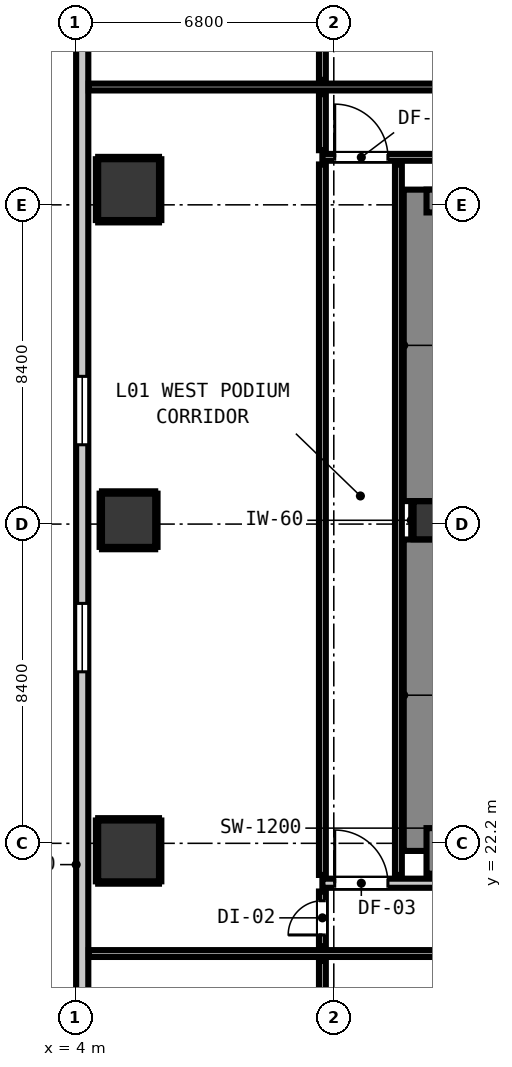
"""IFC4 building model, lengths in metres.
Left out: names, types, materials, properties, quantities, classifications, styles, units other than length and angle.
Written with IfcOpenShell. Run it as: python <this file> out.ifc"""

import sys

from ifc_helpers import new_model, si_unit, direction, frame, frame_2d, origin, origin_2d, place, context, subcontext, project, spatial, rectangle, extrude, element, fill, save


model = new_model("IFC4")
c1 = context("Model", 3, precision=1e-05, world=origin(), true_north=direction((0.0, 1.0)))
c2 = subcontext(c1, "Body", "Model", "MODEL_VIEW")
j1 = project(units=[si_unit("LENGTHUNIT", "METRE"), si_unit("PLANEANGLEUNIT", "RADIAN")], contexts=[c1])
p1 = place(None, origin())
s1 = spatial("IfcSite", under=j1, at=p1, CompositionType="ELEMENT")
p2 = place(p1, origin())
s2 = spatial("IfcBuilding", under=s1, at=p2, CompositionType="ELEMENT")
p3 = place(p2, frame((0.0, 0.0, 5.2)))
s3 = spatial("IfcBuildingStorey", under=s2, at=p3, CompositionType="ELEMENT", Elevation=5.2)
p4 = place(p3, frame((13.4, 30.7, 0.0), z_axis=(0.0, 0.0, 1.0), x_axis=(1.0, 0.0, 0.0)))
e1 = element("IfcColumn", 1, at=p4, inside=s3, PredefinedType="COLUMN", context=c2, shape_type="SweptSolid", body=[
    extrude(rectangle(XDim=1.0, YDim=1.0, at=origin_2d()), origin(), (0.0, 0.0, 1.0), 4.2),
])
p5 = place(p3, frame((13.24, 22.0, 0.0), z_axis=(0.0, 0.0, 1.0), x_axis=(0.0, 1.0, 0.0)))
e2 = element("IfcWall", 2, at=p5, inside=s3, PredefinedType="SHEAR", context=c2, shape_type="SweptSolid", body=[
    extrude(rectangle(XDim=8.195, YDim=1.2, at=frame_2d((4.098, 0.0))), origin(), (0.0, 0.0, 1.0), 4.2),
])
p6 = place(p3, frame((13.24, 31.205, 0.0), z_axis=(0.0, 0.0, 1.0), x_axis=(0.0, 1.0, 0.0)))
e3 = element("IfcWall", 3, at=p6, inside=s3, PredefinedType="SHEAR", context=c2, shape_type="SweptSolid", body=[
    extrude(rectangle(XDim=8.195, YDim=1.2, at=frame_2d((4.097, 0.0))), origin(), (0.0, 0.0, 1.0), 4.2),
])
p7 = place(p3, frame((13.24, 22.0, 0.0), z_axis=(0.0, 0.0, 1.0), x_axis=(1.0, 0.0, 0.0)))
e4 = element("IfcWall", 4, at=p7, inside=s3, PredefinedType="SHEAR", context=c2, shape_type="SweptSolid", body=[
    extrude(rectangle(XDim=4.08, YDim=1.2, at=frame_2d((2.04, 0.0))), origin(), (0.0, 0.0, 1.0), 4.2),
])
p8 = place(p3, frame((13.24, 39.1, 0.0), z_axis=(0.0, 0.0, 1.0), x_axis=(1.0, 0.0, 0.0)))
e5 = element("IfcWall", 5, at=p8, inside=s3, PredefinedType="SHEAR", context=c2, shape_type="SweptSolid", body=[
    extrude(rectangle(XDim=4.08, YDim=0.6, at=frame_2d((2.04, 0.0))), origin(), (0.0, 0.0, 1.0), 4.2),
])
p9 = place(p3, frame((5.4, 22.0, 0.0), z_axis=(0.0, 0.0, 1.0), x_axis=(1.0, 0.0, 0.0)))
e6 = element("IfcColumn", 6, at=p9, inside=s3, PredefinedType="COLUMN", context=c2, shape_type="SweptSolid", body=[
    extrude(rectangle(XDim=1.6, YDim=1.6, at=origin_2d()), origin(), (0.0, 0.0, 1.0), 4.2),
])
p10 = place(p3, frame((5.4, 30.7, 0.0), z_axis=(0.0, 0.0, 1.0), x_axis=(1.0, 0.0, 0.0)))
e7 = element("IfcColumn", 7, at=p10, inside=s3, PredefinedType="COLUMN", context=c2, shape_type="SweptSolid", body=[
    extrude(rectangle(XDim=1.4, YDim=1.4, at=origin_2d()), origin(), (0.0, 0.0, 1.0), 4.2),
])
p11 = place(p3, frame((5.4, 39.4, 0.0), z_axis=(0.0, 0.0, 1.0), x_axis=(1.0, 0.0, 0.0)))
e8 = element("IfcColumn", 8, at=p11, inside=s3, PredefinedType="COLUMN", context=c2, shape_type="SweptSolid", body=[
    extrude(rectangle(XDim=1.6, YDim=1.6, at=origin_2d()), origin(), (0.0, 0.0, 1.0), 4.2),
])
p12 = place(p3, frame((4.18, 12.68, 0.0), z_axis=(0.0, 0.0, 1.0), x_axis=(0.0, 1.0, 0.0)))
e9 = element("IfcWall", 9, at=p12, inside=s3, PredefinedType="STANDARD", context=c2, shape_type="SweptSolid", body=[
    extrude(rectangle(XDim=35.84, YDim=0.32, at=frame_2d((17.92, 0.0))), origin(), (0.0, 0.0, 1.0), 3.92),
])
p13 = place(p12, frame((2.087, 0.0, 0.9)))
e10 = element("IfcOpeningElement", 10, at=p13, cuts=e9, PredefinedType="OPENING", context=c2, shape_type="SweptSolid", body=[
    extrude(rectangle(XDim=1.8, YDim=1.9, at=frame_2d((0.9, 0.95))), frame((0.0, 0.17, 0.0), z_axis=(0.0, -1.0, 0.0), x_axis=(1.0, 0.0, 0.0)), (0.0, 0.0, 1.0), 0.34),
])
p14 = place(p12, frame((14.033, 0.0, 0.9)))
e11 = element("IfcOpeningElement", 11, at=p14, cuts=e9, PredefinedType="OPENING", context=c2, shape_type="SweptSolid", body=[
    extrude(rectangle(XDim=1.8, YDim=1.9, at=frame_2d((0.9, 0.95))), frame((0.0, 0.17, 0.0), z_axis=(0.0, -1.0, 0.0), x_axis=(1.0, 0.0, 0.0)), (0.0, 0.0, 1.0), 0.34),
])
p15 = place(p12, frame((20.007, 0.0, 0.9)))
e12 = element("IfcOpeningElement", 12, at=p15, cuts=e9, PredefinedType="OPENING", context=c2, shape_type="SweptSolid", body=[
    extrude(rectangle(XDim=1.8, YDim=1.9, at=frame_2d((0.9, 0.95))), frame((0.0, 0.17, 0.0), z_axis=(0.0, -1.0, 0.0), x_axis=(1.0, 0.0, 0.0)), (0.0, 0.0, 1.0), 0.34),
])
p16 = place(p12, frame((31.953, 0.0, 0.9)))
e13 = element("IfcOpeningElement", 13, at=p16, cuts=e9, PredefinedType="OPENING", context=c2, shape_type="SweptSolid", body=[
    extrude(rectangle(XDim=1.8, YDim=1.9, at=frame_2d((0.9, 0.95))), frame((0.0, 0.17, 0.0), z_axis=(0.0, -1.0, 0.0), x_axis=(1.0, 0.0, 0.0)), (0.0, 0.0, 1.0), 0.34),
])
p17 = place(p3, frame((10.5, 21.15, 0.0), z_axis=(0.0, 0.0, 1.0), x_axis=(1.0, 0.0, 0.0)))
e14 = element("IfcWall", 14, at=p17, inside=s3, PredefinedType="PARTITIONING", context=c2, shape_type="SweptSolid", body=[
    extrude(rectangle(XDim=28.7, YDim=0.24, at=frame_2d((14.35, 0.0))), origin(), (0.0, 0.0, 1.0), 3.92),
])
p18 = place(p17, frame((7.71, 0.0, 0.0)))
e15 = element("IfcOpeningElement", 15, at=p18, cuts=e14, PredefinedType="OPENING", context=c2, shape_type="SweptSolid", body=[
    extrude(rectangle(XDim=1.1, YDim=2.15, at=frame_2d((0.55, 1.075))), frame((0.0, 0.13, 0.0), z_axis=(0.0, -1.0, 0.0), x_axis=(1.0, 0.0, 0.0)), (0.0, 0.0, 1.0), 0.26),
])
p19 = place(p17, frame((0.324, 0.0, 0.0)))
e16 = element("IfcOpeningElement", 16, at=p19, cuts=e14, PredefinedType="OPENING", context=c2, shape_type="SweptSolid", body=[
    extrude(rectangle(XDim=1.4, YDim=2.15, at=frame_2d((0.7, 1.075))), frame((0.0, 0.13, 0.0), z_axis=(0.0, -1.0, 0.0), x_axis=(1.0, 0.0, 0.0)), (0.0, 0.0, 1.0), 0.26),
])
p20 = place(p17, frame((27.026, 0.0, 0.0)))
e17 = element("IfcOpeningElement", 17, at=p20, cuts=e14, PredefinedType="OPENING", context=c2, shape_type="SweptSolid", body=[
    extrude(rectangle(XDim=1.4, YDim=2.15, at=frame_2d((0.7, 1.075))), frame((0.0, 0.13, 0.0), z_axis=(0.0, -1.0, 0.0), x_axis=(1.0, 0.0, 0.0)), (0.0, 0.0, 1.0), 0.26),
])
p21 = place(p3, frame((4.352, 19.3, 0.0), z_axis=(0.0, 0.0, 1.0), x_axis=(1.0, 0.0, 0.0)))
e18 = element("IfcWall", 18, at=p21, inside=s3, PredefinedType="PARTITIONING", context=c2, shape_type="SweptSolid", body=[
    extrude(rectangle(XDim=43.296, YDim=0.18, at=frame_2d((21.648, 0.0))), origin(), (0.0, 0.0, 1.0), 3.92),
])
p22 = place(p21, frame((12.248, 0.0, 0.0)))
e19 = element("IfcOpeningElement", 19, at=p22, cuts=e18, PredefinedType="OPENING", context=c2, shape_type="SweptSolid", body=[
    extrude(rectangle(XDim=1.0, YDim=2.15, at=frame_2d((0.5, 1.075))), frame((0.0, 0.1, 0.0), z_axis=(0.0, -1.0, 0.0), x_axis=(1.0, 0.0, 0.0)), (0.0, 0.0, 1.0), 0.2),
])
p23 = place(p21, frame((27.998, 0.0, 0.0)))
e20 = element("IfcOpeningElement", 20, at=p23, cuts=e18, PredefinedType="OPENING", context=c2, shape_type="SweptSolid", body=[
    extrude(rectangle(XDim=1.0, YDim=2.15, at=frame_2d((0.5, 1.075))), frame((0.0, 0.1, 0.0), z_axis=(0.0, -1.0, 0.0), x_axis=(1.0, 0.0, 0.0)), (0.0, 0.0, 1.0), 0.2),
])
p24 = place(p3, frame((10.5, 40.25, 0.0), z_axis=(0.0, 0.0, 1.0), x_axis=(1.0, 0.0, 0.0)))
e21 = element("IfcWall", 21, at=p24, inside=s3, PredefinedType="PARTITIONING", context=c2, shape_type="SweptSolid", body=[
    extrude(rectangle(XDim=37.148, YDim=0.18, at=frame_2d((18.574, 0.0))), origin(), (0.0, 0.0, 1.0), 3.92),
])
p25 = place(p24, frame((6.935, 0.0, 0.0)))
e22 = element("IfcOpeningElement", 22, at=p25, cuts=e21, PredefinedType="OPENING", context=c2, shape_type="SweptSolid", body=[
    extrude(rectangle(XDim=1.4, YDim=2.15, at=frame_2d((0.7, 1.075))), frame((0.0, 0.1, 0.0), z_axis=(0.0, -1.0, 0.0), x_axis=(1.0, 0.0, 0.0)), (0.0, 0.0, 1.0), 0.2),
])
p26 = place(p24, frame((0.324, 0.0, 0.0)))
e23 = element("IfcOpeningElement", 23, at=p26, cuts=e21, PredefinedType="OPENING", context=c2, shape_type="SweptSolid", body=[
    extrude(rectangle(XDim=1.4, YDim=2.15, at=frame_2d((0.7, 1.075))), frame((0.0, 0.1, 0.0), z_axis=(0.0, -1.0, 0.0), x_axis=(1.0, 0.0, 0.0)), (0.0, 0.0, 1.0), 0.2),
])
p27 = place(p24, frame((27.05, 0.0, 0.0)))
e24 = element("IfcOpeningElement", 24, at=p27, cuts=e21, PredefinedType="OPENING", context=c2, shape_type="SweptSolid", body=[
    extrude(rectangle(XDim=1.4, YDim=2.15, at=frame_2d((0.7, 1.075))), frame((0.0, 0.1, 0.0), z_axis=(0.0, -1.0, 0.0), x_axis=(1.0, 0.0, 0.0)), (0.0, 0.0, 1.0), 0.2),
])
p28 = place(p3, frame((4.352, 42.1, 0.0), z_axis=(0.0, 0.0, 1.0), x_axis=(1.0, 0.0, 0.0)))
e25 = element("IfcWall", 25, at=p28, inside=s3, PredefinedType="PARTITIONING", context=c2, shape_type="SweptSolid", body=[
    extrude(rectangle(XDim=43.296, YDim=0.18, at=frame_2d((21.648, 0.0))), origin(), (0.0, 0.0, 1.0), 3.92),
])
p29 = place(p28, frame((10.072, 0.0, 0.0)))
e26 = element("IfcOpeningElement", 26, at=p29, cuts=e25, PredefinedType="OPENING", context=c2, shape_type="SweptSolid", body=[
    extrude(rectangle(XDim=0.9, YDim=2.1, at=frame_2d((0.45, 1.05))), frame((0.0, 0.1, 0.0), z_axis=(0.0, -1.0, 0.0), x_axis=(1.0, 0.0, 0.0)), (0.0, 0.0, 1.0), 0.2),
])
p30 = place(p28, frame((18.798, 0.0, 0.0)))
e27 = element("IfcOpeningElement", 27, at=p30, cuts=e25, PredefinedType="OPENING", context=c2, shape_type="SweptSolid", body=[
    extrude(rectangle(XDim=0.9, YDim=2.1, at=frame_2d((0.45, 1.05))), frame((0.0, 0.1, 0.0), z_axis=(0.0, -1.0, 0.0), x_axis=(1.0, 0.0, 0.0)), (0.0, 0.0, 1.0), 0.2),
])
p31 = place(p28, frame((25.118, 0.0, 0.0)))
e28 = element("IfcOpeningElement", 28, at=p31, cuts=e25, PredefinedType="OPENING", context=c2, shape_type="SweptSolid", body=[
    extrude(rectangle(XDim=0.86, YDim=2.02, at=frame_2d((0.43, 1.01))), frame((0.0, 0.1, 0.0), z_axis=(0.0, -1.0, 0.0), x_axis=(1.0, 0.0, 0.0)), (0.0, 0.0, 1.0), 0.2),
])
p32 = place(p28, frame((29.218, 0.0, 0.0)))
e29 = element("IfcOpeningElement", 29, at=p32, cuts=e25, PredefinedType="OPENING", context=c2, shape_type="SweptSolid", body=[
    extrude(rectangle(XDim=0.86, YDim=2.02, at=frame_2d((0.43, 1.01))), frame((0.0, 0.1, 0.0), z_axis=(0.0, -1.0, 0.0), x_axis=(1.0, 0.0, 0.0)), (0.0, 0.0, 1.0), 0.2),
])
p33 = place(p28, frame((32.873, 0.0, 0.0)))
e30 = element("IfcOpeningElement", 30, at=p33, cuts=e25, PredefinedType="OPENING", context=c2, shape_type="SweptSolid", body=[
    extrude(rectangle(XDim=0.95, YDim=2.1, at=frame_2d((0.475, 1.05))), frame((0.0, 0.1, 0.0), z_axis=(0.0, -1.0, 0.0), x_axis=(1.0, 0.0, 0.0)), (0.0, 0.0, 1.0), 0.2),
])
p34 = place(p28, frame((35.688, 0.0, 0.0)))
e31 = element("IfcOpeningElement", 31, at=p34, cuts=e25, PredefinedType="OPENING", context=c2, shape_type="SweptSolid", body=[
    extrude(rectangle(XDim=0.9, YDim=2.1, at=frame_2d((0.45, 1.05))), frame((0.0, 0.1, 0.0), z_axis=(0.0, -1.0, 0.0), x_axis=(1.0, 0.0, 0.0)), (0.0, 0.0, 1.0), 0.2),
])
p35 = place(p3, frame((10.5, 16.372, 0.0), z_axis=(0.0, 0.0, 1.0), x_axis=(0.0, 1.0, 0.0)))
e32 = element("IfcWall", 32, at=p35, inside=s3, PredefinedType="PARTITIONING", context=c2, shape_type="SweptSolid", body=[
    extrude(rectangle(XDim=2.74, YDim=0.18, at=frame_2d((1.37, 0.0))), origin(), (0.0, 0.0, 1.0), 3.92),
])
p36 = place(p3, frame((10.5, 19.488, 0.0), z_axis=(0.0, 0.0, 1.0), x_axis=(0.0, 1.0, 0.0)))
e33 = element("IfcWall", 33, at=p36, inside=s3, PredefinedType="PARTITIONING", context=c2, shape_type="SweptSolid", body=[
    extrude(rectangle(XDim=1.444, YDim=0.18, at=frame_2d((0.722, 0.0))), origin(), (0.0, 0.0, 1.0), 3.92),
])
p37 = place(p36, frame((0.301, 0.0, 0.0)))
e34 = element("IfcOpeningElement", 34, at=p37, cuts=e33, PredefinedType="OPENING", context=c2, shape_type="SweptSolid", body=[
    extrude(rectangle(XDim=0.9, YDim=2.1, at=frame_2d((0.45, 1.05))), frame((0.0, 0.1, 0.0), z_axis=(0.0, -1.0, 0.0), x_axis=(1.0, 0.0, 0.0)), (0.0, 0.0, 1.0), 0.2),
])
p38 = place(p3, frame((10.5, 21.368, 0.0), z_axis=(0.0, 0.0, 1.0), x_axis=(0.0, 1.0, 0.0)))
e35 = element("IfcWall", 35, at=p38, inside=s3, PredefinedType="PARTITIONING", context=c2, shape_type="SweptSolid", body=[
    extrude(rectangle(XDim=18.694, YDim=0.18, at=frame_2d((9.347, 0.0))), origin(), (0.0, 0.0, 1.0), 3.92),
])
p39 = place(p3, frame((10.5, 40.438, 0.0), z_axis=(0.0, 0.0, 1.0), x_axis=(0.0, 1.0, 0.0)))
e36 = element("IfcWall", 36, at=p39, inside=s3, PredefinedType="PARTITIONING", context=c2, shape_type="SweptSolid", body=[
    extrude(rectangle(XDim=1.474, YDim=0.18, at=frame_2d((0.737, 0.0))), origin(), (0.0, 0.0, 1.0), 3.92),
])
p40 = place(p3, frame((10.5, 42.288, 0.0), z_axis=(0.0, 0.0, 1.0), x_axis=(0.0, 1.0, 0.0)))
e37 = element("IfcWall", 37, at=p40, inside=s3, PredefinedType="PARTITIONING", context=c2, shape_type="SweptSolid", body=[
    extrude(rectangle(XDim=8.56, YDim=0.18, at=frame_2d((4.28, 0.0))), origin(), (0.0, 0.0, 1.0), 3.92),
])
p41 = place(p3, frame((12.5, 21.368, 0.0), z_axis=(0.0, 0.0, 1.0), x_axis=(0.0, 1.0, 0.0)))
e38 = element("IfcWall", 38, at=p41, inside=s3, PredefinedType="PARTITIONING", context=c2, shape_type="SweptSolid", body=[
    extrude(rectangle(XDim=18.694, YDim=0.18, at=frame_2d((9.347, 0.0))), origin(), (0.0, 0.0, 1.0), 3.92),
])
p42 = place(p3, frame((12.868, 30.21, 0.0), z_axis=(0.0, 0.0, 1.0), x_axis=(0.0, 1.0, 0.0)))
e39 = element("IfcWall", 39, at=p42, inside=s3, PredefinedType="PARTITIONING", context=c2, shape_type="SweptSolid", body=[
    extrude(rectangle(XDim=0.98, YDim=0.06, at=frame_2d((0.49, 0.0))), origin(), (0.0, 0.0, 1.0), 1.45),
])
for number, where, z_axis, x_axis in (
    (40, (4.6, 21.168, 0.0), (0.0, 0.0, 1.0), (1.0, 0.0, 0.0)),
    (41, (4.6, 22.832, 0.0), (0.0, 0.0, 1.0), (1.0, 0.0, 0.0)),
):
    element("IfcWall", number, at=place(p3, frame(where, z_axis=z_axis, x_axis=x_axis)), inside=s3, PredefinedType="PARTITIONING", context=c2, shape_type="SweptSolid", body=[
        extrude(rectangle(XDim=1.6, YDim=0.06, at=frame_2d((0.8, 0.0))), origin(), (0.0, 0.0, 1.0), 1.45),
    ])
for number, where, z_axis, x_axis in (
    (42, (4.568, 21.2, 0.0), (0.0, 0.0, 1.0), (0.0, 1.0, 0.0)),
    (43, (6.232, 21.2, 0.0), (0.0, 0.0, 1.0), (0.0, 1.0, 0.0)),
):
    element("IfcWall", number, at=place(p3, frame(where, z_axis=z_axis, x_axis=x_axis)), inside=s3, PredefinedType="PARTITIONING", context=c2, shape_type="SweptSolid", body=[
        extrude(rectangle(XDim=1.6, YDim=0.06, at=frame_2d((0.8, 0.0))), origin(), (0.0, 0.0, 1.0), 1.45),
    ])
for number, where, z_axis, x_axis in (
    (44, (4.7, 29.968, 0.0), (0.0, 0.0, 1.0), (1.0, 0.0, 0.0)),
    (45, (4.7, 31.432, 0.0), (0.0, 0.0, 1.0), (1.0, 0.0, 0.0)),
):
    element("IfcWall", number, at=place(p3, frame(where, z_axis=z_axis, x_axis=x_axis)), inside=s3, PredefinedType="PARTITIONING", context=c2, shape_type="SweptSolid", body=[
        extrude(rectangle(XDim=1.4, YDim=0.06, at=frame_2d((0.7, 0.0))), origin(), (0.0, 0.0, 1.0), 1.45),
    ])
for number, where, z_axis, x_axis in (
    (46, (4.668, 30.0, 0.0), (0.0, 0.0, 1.0), (0.0, 1.0, 0.0)),
    (47, (6.132, 30.0, 0.0), (0.0, 0.0, 1.0), (0.0, 1.0, 0.0)),
):
    element("IfcWall", number, at=place(p3, frame(where, z_axis=z_axis, x_axis=x_axis)), inside=s3, PredefinedType="PARTITIONING", context=c2, shape_type="SweptSolid", body=[
        extrude(rectangle(XDim=1.4, YDim=0.06, at=frame_2d((0.7, 0.0))), origin(), (0.0, 0.0, 1.0), 1.45),
    ])
for number, where, z_axis, x_axis in (
    (48, (4.6, 38.568, 0.0), (0.0, 0.0, 1.0), (1.0, 0.0, 0.0)),
    (49, (4.6, 40.232, 0.0), (0.0, 0.0, 1.0), (1.0, 0.0, 0.0)),
    (50, (4.568, 38.6, 0.0), (0.0, 0.0, 1.0), (0.0, 1.0, 0.0)),
    (51, (6.232, 38.6, 0.0), (0.0, 0.0, 1.0), (0.0, 1.0, 0.0)),
):
    element("IfcWall", number, at=place(p3, frame(where, z_axis=z_axis, x_axis=x_axis)), inside=s3, PredefinedType="PARTITIONING", context=c2, shape_type="SweptSolid", body=[
        extrude(rectangle(XDim=1.6, YDim=0.06, at=frame_2d((0.8, 0.0))), origin(), (0.0, 0.0, 1.0), 1.45),
    ])
p43 = place(p14, origin())
e52 = element("IfcWindow", 52, at=p43, inside=s3, PartitioningType="SINGLE_PANEL", PredefinedType="WINDOW", context=c2, shape_type="SweptSolid", body=[
    extrude(rectangle(XDim=1.8, YDim=1.9, at=frame_2d((0.9, 0.95))), frame((0.0, 0.03, 0.0), z_axis=(0.0, -1.0, 0.0), x_axis=(1.0, 0.0, 0.0)), (0.0, 0.0, 1.0), 0.06),
])
fill(e11, e52)
p44 = place(p15, origin())
e53 = element("IfcWindow", 53, at=p44, inside=s3, PartitioningType="SINGLE_PANEL", PredefinedType="WINDOW", context=c2, shape_type="SweptSolid", body=[
    extrude(rectangle(XDim=1.8, YDim=1.9, at=frame_2d((0.9, 0.95))), frame((0.0, 0.03, 0.0), z_axis=(0.0, -1.0, 0.0), x_axis=(1.0, 0.0, 0.0)), (0.0, 0.0, 1.0), 0.06),
])
fill(e12, e53)
p45 = place(p19, origin())
e54 = element("IfcDoor", 54, at=p45, inside=s3, OperationType="SINGLE_SWING_LEFT", PredefinedType="DOOR", context=c2, shape_type="SweptSolid", body=[
    extrude(rectangle(XDim=1.4, YDim=2.15, at=frame_2d((0.7, 1.075))), frame((0.0, 0.025, 0.0), z_axis=(0.0, -1.0, 0.0), x_axis=(1.0, 0.0, 0.0)), (0.0, 0.0, 1.0), 0.05),
])
fill(e16, e54)
p46 = place(p26, origin())
e55 = element("IfcDoor", 55, at=p46, inside=s3, OperationType="SINGLE_SWING_LEFT", PredefinedType="DOOR", context=c2, shape_type="SweptSolid", body=[
    extrude(rectangle(XDim=1.4, YDim=2.15, at=frame_2d((0.7, 1.075))), frame((0.0, 0.025, 0.0), z_axis=(0.0, -1.0, 0.0), x_axis=(1.0, 0.0, 0.0)), (0.0, 0.0, 1.0), 0.05),
])
fill(e23, e55)
p47 = place(p37, origin())
e56 = element("IfcDoor", 56, at=p47, inside=s3, OperationType="SINGLE_SWING_LEFT", PredefinedType="DOOR", context=c2, shape_type="SweptSolid", body=[
    extrude(rectangle(XDim=0.9, YDim=2.1, at=frame_2d((0.45, 1.05))), frame((0.0, 0.025, 0.0), z_axis=(0.0, -1.0, 0.0), x_axis=(1.0, 0.0, 0.0)), (0.0, 0.0, 1.0), 0.05),
])
fill(e34, e56)
save(model, sys.argv[1])
